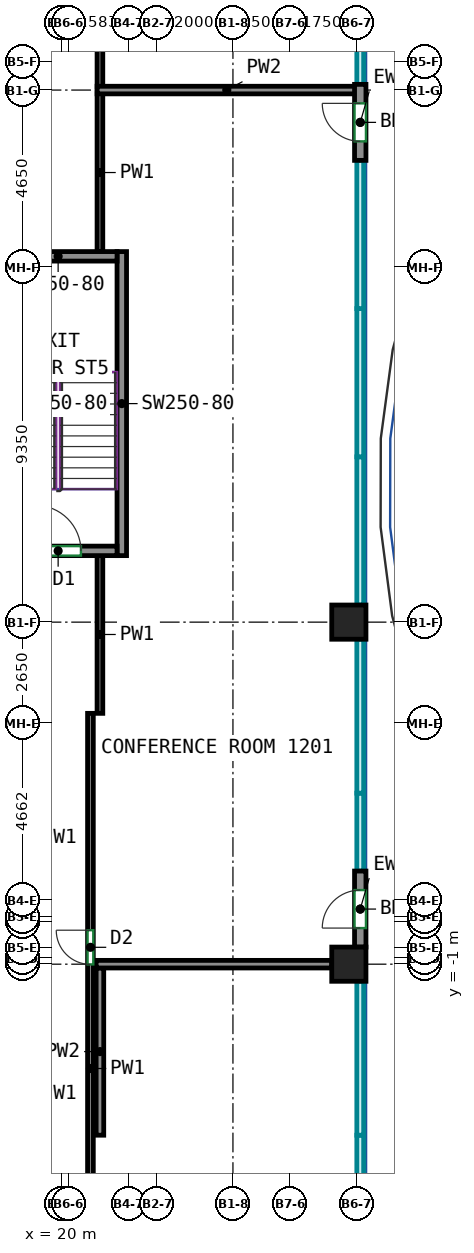
"""IFC4 building model, lengths in metres.
Left out: names, types, materials, properties, quantities, classifications, styles, units other than length and angle.
Written with IfcOpenShell. Run it as: python <this file> out.ifc"""

import sys

from ifc_helpers import new_model, si_unit, direction, frame, frame_2d, origin, origin_2d, place, context, subcontext, project, spatial, rectangle, extrude, source, transform, mapped, element, fill, save


model = new_model("IFC4")
c1 = context("Model", 3, precision=1e-05, world=origin(), true_north=direction((0.0, 1.0)))
c2 = subcontext(c1, "Body", "Model", "MODEL_VIEW")
j1 = project(units=[si_unit("LENGTHUNIT", "METRE"), si_unit("PLANEANGLEUNIT", "RADIAN")], contexts=[c1])
p1 = place(None, origin())
s1 = spatial("IfcSite", under=j1, at=p1, CompositionType="ELEMENT")
p2 = place(p1, origin())
s2 = spatial("IfcBuilding", under=s1, at=p2, CompositionType="ELEMENT")
p3 = place(p2, frame((0.0, 0.0, 55.0)))
s3 = spatial("IfcBuildingStorey", under=s2, at=p3, CompositionType="ELEMENT", Elevation=55.0)
m1 = source(origin(), c2, "Body", "SweptSolid", [
    extrude(rectangle(XDim=0.9, YDim=0.9, at=origin_2d()), origin(), (0.0, 0.0, 1.0), 3.6),
])
for number, where, z_axis, x_axis in (
    (1, (27.55, -1.0, 0.0), (0.0, 0.0, 1.0), (1.0, 0.0, 0.0)),
    (2, (27.55, 8.0, 0.0), (0.0, 0.0, 1.0), (1.0, 0.0, 0.0)),
):
    element("IfcColumn", number, at=place(p3, frame(where, z_axis=z_axis, x_axis=x_axis)), inside=s3, PredefinedType="COLUMN", context=c2, shape_type="MappedRepresentation", body=[
        mapped(m1, transform((0.0, 0.0, 0.0))),
    ])
m2 = source(origin(), c2, "Body", "SweptSolid", [
    extrude(rectangle(XDim=8.0, YDim=0.25, at=frame_2d((4.0, 0.0))), origin(), (0.0, 0.0, 1.0), 3.6),
])
p4 = place(p3, frame((21.575, 9.75, 0.0), z_axis=(0.0, 0.0, 1.0), x_axis=(0.0, 1.0, 0.0)))
e3 = element("IfcWall", 3, at=p4, inside=s3, PredefinedType="SHEAR", context=c2, shape_type="MappedRepresentation", body=[
    mapped(m2, transform((0.0, 0.0, 0.0))),
])
m3 = source(origin(), c2, "Body", "SweptSolid", [
    extrude(rectangle(XDim=3.1, YDim=0.25, at=frame_2d((1.55, 0.0))), origin(), (0.0, 0.0, 1.0), 3.6),
])
p5 = place(p3, frame((18.35, 9.875, 0.0), z_axis=(0.0, 0.0, 1.0), x_axis=(1.0, 0.0, 0.0)))
e4 = element("IfcWall", 4, at=p5, inside=s3, PredefinedType="SHEAR", context=c2, shape_type="MappedRepresentation", body=[
    mapped(m3, transform((0.0, 0.0, 0.0))),
])
p6 = place(p5, frame((0.95, 0.0, 0.0)))
e5 = element("IfcOpeningElement", 5, at=p6, cuts=e4, PredefinedType="OPENING", context=c2, shape_type="SweptSolid", body=[
    extrude(rectangle(XDim=1.2, YDim=2.1, at=frame_2d((0.6, 1.05))), frame((0.0, 0.135, 0.0), z_axis=(0.0, -1.0, 0.0), x_axis=(1.0, 0.0, 0.0)), (0.0, 0.0, 1.0), 0.27),
])
p7 = place(p3, frame((18.35, 17.625, 0.0), z_axis=(0.0, 0.0, 1.0), x_axis=(1.0, 0.0, 0.0)))
e6 = element("IfcWall", 6, at=p7, inside=s3, PredefinedType="SHEAR", context=c2, shape_type="MappedRepresentation", body=[
    mapped(m3, transform((0.0, 0.0, 0.0))),
])
m4 = source(origin(), c2, "Body", "SweptSolid", [
    extrude(rectangle(XDim=2.0, YDim=0.3, at=frame_2d((1.0, 0.0))), origin(), (0.0, 0.0, 1.0), 3.6),
])
p8 = place(p3, frame((27.85, -0.55, 0.0), z_axis=(0.0, 0.0, 1.0), x_axis=(0.0, 1.0, 0.0)))
e7 = element("IfcWall", 7, at=p8, inside=s3, PredefinedType="SOLIDWALL", context=c2, shape_type="MappedRepresentation", body=[
    mapped(m4, transform((0.0, 0.0, 0.0))),
])
p9 = place(p8, frame((0.5, 0.0, 0.0)))
e8 = element("IfcOpeningElement", 8, at=p9, cuts=e7, PredefinedType="OPENING", context=c2, shape_type="SweptSolid", body=[
    extrude(rectangle(XDim=1.0, YDim=2.1, at=frame_2d((0.5, 1.05))), frame((0.0, 0.16, 0.0), z_axis=(0.0, -1.0, 0.0), x_axis=(1.0, 0.0, 0.0)), (0.0, 0.0, 1.0), 0.32),
])
p10 = place(p3, frame((27.85, 20.15, 0.0), z_axis=(0.0, 0.0, 1.0), x_axis=(0.0, 1.0, 0.0)))
e9 = element("IfcWall", 9, at=p10, inside=s3, PredefinedType="SOLIDWALL", context=c2, shape_type="MappedRepresentation", body=[
    mapped(m4, transform((0.0, 0.0, 0.0))),
])
p11 = place(p10, frame((0.5, 0.0, 0.0)))
e10 = element("IfcOpeningElement", 10, at=p11, cuts=e9, PredefinedType="OPENING", context=c2, shape_type="SweptSolid", body=[
    extrude(rectangle(XDim=1.0, YDim=2.1, at=frame_2d((0.5, 1.05))), frame((0.0, 0.16, 0.0), z_axis=(0.0, -1.0, 0.0), x_axis=(1.0, 0.0, 0.0)), (0.0, 0.0, 1.0), 0.32),
])
p12 = place(p3, frame((20.75, -7.75, 0.0), z_axis=(0.0, 0.0, 1.0), x_axis=(0.0, 1.0, 0.0)))
e11 = element("IfcWall", 11, at=p12, inside=s3, PredefinedType="PARTITIONING", context=c2, shape_type="SweptSolid", body=[
    extrude(rectangle(XDim=13.35, YDim=0.15, at=frame_2d((6.675, 0.0))), origin(), (0.0, 0.0, 1.0), 3.6),
])
p13 = place(p12, frame((6.744, 0.0, 0.0)))
e12 = element("IfcOpeningElement", 12, at=p13, cuts=e11, PredefinedType="OPENING", context=c2, shape_type="SweptSolid", body=[
    extrude(rectangle(XDim=0.9, YDim=2.1, at=frame_2d((0.45, 1.05))), frame((0.0, 0.085, 0.0), z_axis=(0.0, -1.0, 0.0), x_axis=(1.0, 0.0, 0.0)), (0.0, 0.0, 1.0), 0.17),
])
p14 = place(p3, frame((21.0, 17.75, 0.0), z_axis=(0.0, 0.0, 1.0), x_axis=(0.0, 1.0, 0.0)))
e13 = element("IfcWall", 13, at=p14, inside=s3, PredefinedType="PARTITIONING", context=c2, shape_type="SweptSolid", body=[
    extrude(rectangle(XDim=4.16, YDim=0.15, at=frame_2d((2.08, 0.0))), origin(), (0.0, 0.0, 1.0), 3.6),
])
p15 = place(p3, frame((21.0, 5.6, 0.0), z_axis=(0.0, 0.0, 1.0), x_axis=(0.0, 1.0, 0.0)))
e14 = element("IfcWall", 14, at=p15, inside=s3, PredefinedType="PARTITIONING", context=c2, shape_type="SweptSolid", body=[
    extrude(rectangle(XDim=4.15, YDim=0.15, at=frame_2d((2.075, 0.0))), origin(), (0.0, 0.0, 1.0), 3.6),
])
p16 = place(p3, frame((21.0, 22.09, 0.0), z_axis=(0.0, 0.0, 1.0), x_axis=(0.0, 1.0, 0.0)))
e15 = element("IfcWall", 15, at=p16, inside=s3, PredefinedType="PARTITIONING", context=c2, shape_type="SweptSolid", body=[
    extrude(rectangle(XDim=2.335, YDim=0.15, at=frame_2d((1.167, 0.0))), origin(), (0.0, 0.0, 1.0), 3.6),
])
p17 = place(p3, frame((21.0, -1.1, 0.0), z_axis=(0.0, 0.0, 1.0), x_axis=(0.0, -1.0, 0.0)))
e16 = element("IfcWall", 16, at=p17, inside=s3, PredefinedType="PARTITIONING", context=c2, shape_type="SweptSolid", body=[
    extrude(rectangle(XDim=4.4, YDim=0.2, at=frame_2d((2.2, 0.0))), origin(), (0.0, 0.0, 1.0), 3.6),
])
p18 = place(p3, frame((20.9, -1.0, 0.0), z_axis=(0.0, 0.0, 1.0), x_axis=(1.0, 0.0, 0.0)))
e17 = element("IfcWall", 17, at=p18, inside=s3, PredefinedType="PARTITIONING", context=c2, shape_type="SweptSolid", body=[
    extrude(rectangle(XDim=6.2, YDim=0.2, at=frame_2d((3.1, 0.0))), origin(), (0.0, 0.0, 1.0), 2.95),
])
p19 = place(p3, frame((27.75, 22.0, 0.0), z_axis=(0.0, 0.0, 1.0), x_axis=(-1.0, 0.0, 0.0)))
e18 = element("IfcWall", 18, at=p19, inside=s3, PredefinedType="PARTITIONING", context=c2, shape_type="SweptSolid", body=[
    extrude(rectangle(XDim=6.824, YDim=0.2, at=frame_2d((3.412, 0.0))), origin(), (0.0, 0.0, 1.0), 3.6),
])
p20 = place(p9, origin())
e19 = element("IfcDoor", 19, at=p20, inside=s3, OperationType="SINGLE_SWING_LEFT", PredefinedType="DOOR", context=c2, shape_type="SweptSolid", body=[
    extrude(rectangle(XDim=1.0, YDim=2.1, at=frame_2d((0.5, 1.05))), frame((0.0, 0.025, 0.0), z_axis=(0.0, -1.0, 0.0), x_axis=(1.0, 0.0, 0.0)), (0.0, 0.0, 1.0), 0.05),
])
fill(e8, e19)
p21 = place(p11, origin())
e20 = element("IfcDoor", 20, at=p21, inside=s3, OperationType="SINGLE_SWING_RIGHT", PredefinedType="DOOR", context=c2, shape_type="SweptSolid", body=[
    extrude(rectangle(XDim=1.0, YDim=2.1, at=frame_2d((0.5, 1.05))), frame((0.0, 0.025, 0.0), z_axis=(0.0, -1.0, 0.0), x_axis=(1.0, 0.0, 0.0)), (0.0, 0.0, 1.0), 0.05),
])
fill(e10, e20)
p22 = place(p6, origin())
e21 = element("IfcDoor", 21, at=p22, inside=s3, OperationType="DOUBLE_DOOR_SINGLE_SWING", PredefinedType="DOOR", context=c2, shape_type="SweptSolid", body=[
    extrude(rectangle(XDim=1.2, YDim=2.1, at=frame_2d((0.6, 1.05))), frame((0.0, 0.025, 0.0), z_axis=(0.0, -1.0, 0.0), x_axis=(1.0, 0.0, 0.0)), (0.0, 0.0, 1.0), 0.05),
])
fill(e5, e21)
p23 = place(p13, origin())
e22 = element("IfcDoor", 22, at=p23, inside=s3, OperationType="SINGLE_SWING_RIGHT", PredefinedType="DOOR", context=c2, shape_type="SweptSolid", body=[
    extrude(rectangle(XDim=0.9, YDim=2.1, at=frame_2d((0.45, 1.05))), frame((0.0, 0.025, 0.0), z_axis=(0.0, -1.0, 0.0), x_axis=(1.0, 0.0, 0.0)), (0.0, 0.0, 1.0), 0.05),
])
fill(e12, e22)
save(model, sys.argv[1])
